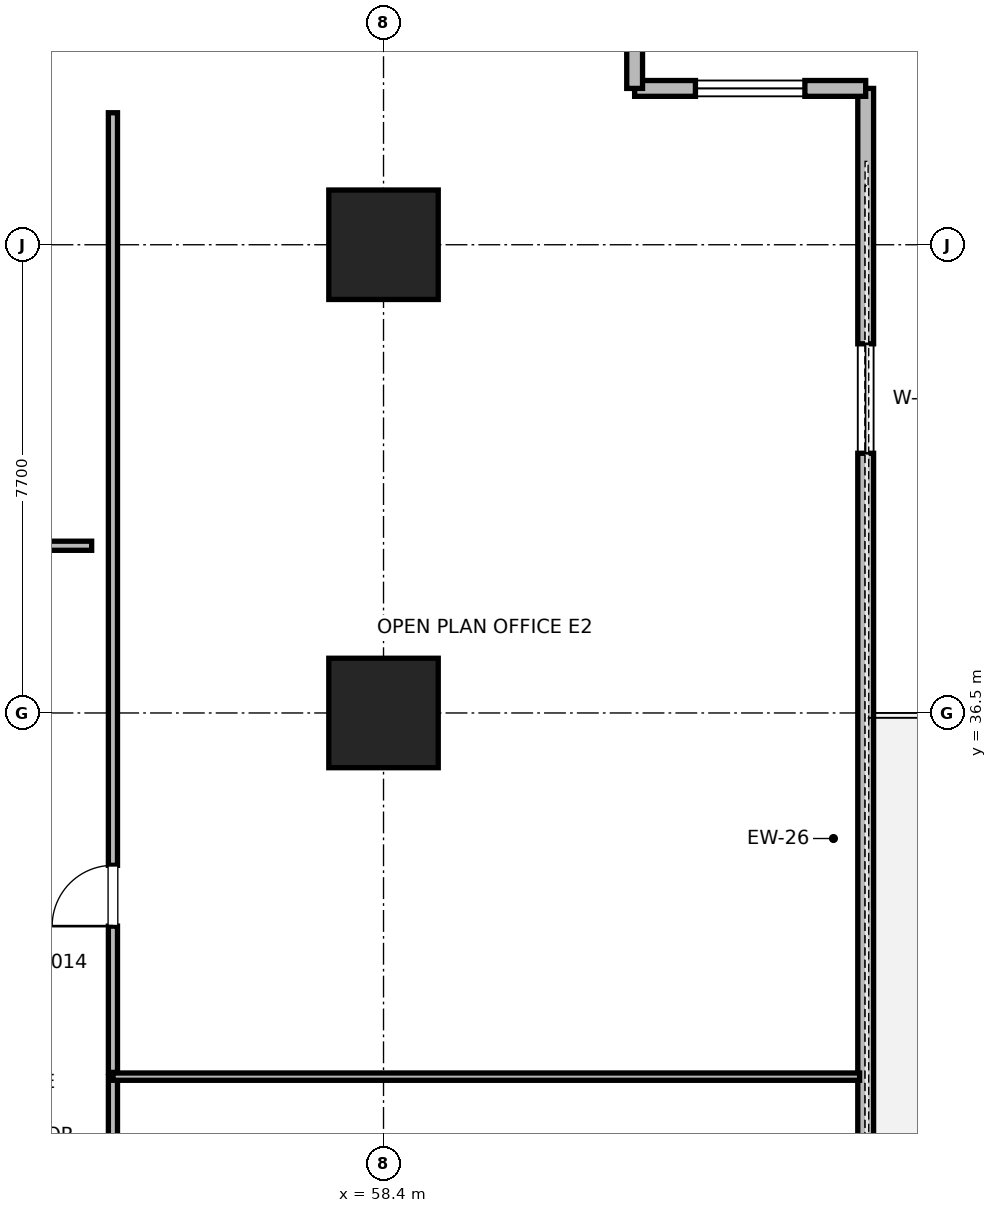
"""IFC4 building model, lengths in metres.
Left out: names, types, materials, properties, quantities, classifications, styles, units other than length and angle.
Written with IfcOpenShell. Run it as: python <this file> out.ifc"""

import sys

from ifc_helpers import new_model, si_unit, direction, frame, frame_2d, origin, origin_2d, place, context, subcontext, project, spatial, rectangle, extrude, element, fill, save


model = new_model("IFC4")
c1 = context("Model", 3, precision=1e-05, world=origin(), true_north=direction((0.0, 1.0)))
c2 = subcontext(c1, "Body", "Model", "MODEL_VIEW")
j1 = project(units=[si_unit("LENGTHUNIT", "METRE"), si_unit("PLANEANGLEUNIT", "RADIAN")], contexts=[c1])
p1 = place(None, origin())
s1 = spatial("IfcSite", under=j1, at=p1, CompositionType="ELEMENT")
p2 = place(p1, origin())
s2 = spatial("IfcBuilding", under=s1, at=p2, CompositionType="ELEMENT")
p3 = place(p2, frame((0.0, 0.0, 87.6)))
s3 = spatial("IfcBuildingStorey", under=s2, at=p3, CompositionType="ELEMENT", Elevation=87.6)
for number, where, z_axis, x_axis in (
    (1, (58.4, 36.5, 0.0), (0.0, 0.0, 1.0), (1.0, 0.0, 0.0)),
    (2, (58.4, 44.2, 0.0), (0.0, 0.0, 1.0), (1.0, 0.0, 0.0)),
):
    element("IfcColumn", number, at=place(p3, frame(where, z_axis=z_axis, x_axis=x_axis)), inside=s3, PredefinedType="COLUMN", context=c2, shape_type="SweptSolid", body=[
        extrude(rectangle(XDim=1.8, YDim=1.8, at=origin_2d()), origin(), (0.0, 0.0, 1.0), 4.0),
    ])
p4 = place(p3, frame((66.33, 8.229, 0.0), z_axis=(0.0, 0.0, 1.0), x_axis=(0.0, 1.0, 0.0)))
e3 = element("IfcWall", 3, at=p4, inside=s3, PredefinedType="PARAPET", context=c2, shape_type="SweptSolid", body=[
    extrude(rectangle(XDim=38.542, YDim=0.26, at=frame_2d((19.271, 0.0))), origin(), (0.0, 0.0, 1.0), 2.889),
])
p5 = place(p4, frame((4.2, 0.0, 0.85)))
e4 = element("IfcOpeningElement", 4, at=p5, cuts=e3, PredefinedType="OPENING", context=c2, shape_type="SweptSolid", body=[
    extrude(rectangle(XDim=1.8, YDim=2.2, at=frame_2d((0.9, 1.1))), frame((0.0, 0.13, 0.0), z_axis=(0.0, -1.0, 0.0), x_axis=(1.0, 0.0, 0.0)), (0.0, 0.0, 1.0), 0.26),
])
p6 = place(p4, frame((18.671, 0.0, 0.0)))
e5 = element("IfcOpeningElement", 5, at=p6, cuts=e3, PredefinedType="OPENING", context=c2, shape_type="SweptSolid", body=[
    extrude(rectangle(XDim=1.2, YDim=2.2, at=frame_2d((0.6, 1.1))), frame((0.0, 0.13, 0.0), z_axis=(0.0, -1.0, 0.0), x_axis=(1.0, 0.0, 0.0)), (0.0, 0.0, 1.0), 0.26),
])
p7 = place(p4, frame((32.542, 0.0, 0.85)))
e6 = element("IfcOpeningElement", 6, at=p7, cuts=e3, PredefinedType="OPENING", context=c2, shape_type="SweptSolid", body=[
    extrude(rectangle(XDim=1.8, YDim=2.2, at=frame_2d((0.9, 1.1))), frame((0.0, 0.13, 0.0), z_axis=(0.0, -1.0, 0.0), x_axis=(1.0, 0.0, 0.0)), (0.0, 0.0, 1.0), 0.26),
])
p8 = place(p3, frame((66.33, 46.771, 0.0), z_axis=(0.0, 0.0, 1.0), x_axis=(-1.0, 0.0, 0.0)))
e7 = element("IfcWall", 7, at=p8, inside=s3, PredefinedType="PARAPET", context=c2, shape_type="SweptSolid", body=[
    extrude(rectangle(XDim=3.8, YDim=0.26, at=frame_2d((1.9, 0.0))), origin(), (0.0, 0.0, 1.0), 3.76),
])
p9 = place(p8, frame((1.0, 0.0, 0.85)))
e8 = element("IfcOpeningElement", 8, at=p9, cuts=e7, PredefinedType="OPENING", context=c2, shape_type="SweptSolid", body=[
    extrude(rectangle(XDim=1.8, YDim=2.2, at=frame_2d((0.9, 1.1))), frame((0.0, 0.13, 0.0), z_axis=(0.0, -1.0, 0.0), x_axis=(1.0, 0.0, 0.0)), (0.0, 0.0, 1.0), 0.26),
])
p10 = place(p3, frame((62.53, 46.771, 0.0), z_axis=(0.0, 0.0, 1.0), x_axis=(0.0, 1.0, 0.0)))
e9 = element("IfcWall", 9, at=p10, inside=s3, PredefinedType="PARAPET", context=c2, shape_type="SweptSolid", body=[
    extrude(rectangle(XDim=3.4, YDim=0.26, at=frame_2d((1.7, 0.0))), origin(), (0.0, 0.0, 1.0), 3.76),
])
p11 = place(p3, frame((48.774, 39.25, 0.0), z_axis=(0.0, 0.0, 1.0), x_axis=(1.0, 0.0, 0.0)))
e10 = element("IfcWall", 10, at=p11, inside=s3, PredefinedType="PARTITIONING", context=c2, shape_type="SweptSolid", body=[
    extrude(rectangle(XDim=4.826, YDim=0.15, at=frame_2d((2.413, 0.0))), origin(), (0.0, 0.0, 1.0), 2.85),
])
p12 = place(p11, frame((1.838, 0.0, 0.0)))
e11 = element("IfcOpeningElement", 11, at=p12, cuts=e10, PredefinedType="OPENING", context=c2, shape_type="SweptSolid", body=[
    extrude(rectangle(XDim=1.05, YDim=2.2, at=frame_2d((0.525, 1.1))), frame((0.0, 0.075, 0.0), z_axis=(0.0, -1.0, 0.0), x_axis=(1.0, 0.0, 0.0)), (0.0, 0.0, 1.0), 0.15),
])
p13 = place(p3, frame((53.95, 8.629, 0.0), z_axis=(0.0, 0.0, 1.0), x_axis=(0.0, 1.0, 0.0)))
e12 = element("IfcWall", 12, at=p13, inside=s3, PredefinedType="PARTITIONING", context=c2, shape_type="SweptSolid", body=[
    extrude(rectangle(XDim=21.89, YDim=0.15, at=frame_2d((10.945, 0.0))), origin(), (0.0, 0.0, 1.0), 2.85),
])
p14 = place(p13, frame((15.396, 0.0, 0.0)))
e13 = element("IfcOpeningElement", 13, at=p14, cuts=e12, PredefinedType="OPENING", context=c2, shape_type="SweptSolid", body=[
    extrude(rectangle(XDim=1.0, YDim=2.15, at=frame_2d((0.5, 1.075))), frame((0.0, 0.075, 0.0), z_axis=(0.0, -1.0, 0.0), x_axis=(1.0, 0.0, 0.0)), (0.0, 0.0, 1.0), 0.15),
])
p15 = place(p3, frame((53.95, 30.519, 0.0), z_axis=(0.0, 0.0, 1.0), x_axis=(1.0, 0.0, 0.0)))
e14 = element("IfcWall", 14, at=p15, inside=s3, PredefinedType="PARTITIONING", context=c2, shape_type="SweptSolid", body=[
    extrude(rectangle(XDim=12.28, YDim=0.12, at=frame_2d((6.14, 0.0))), origin(), (0.0, 0.0, 1.0), 2.85),
])
p16 = place(p3, frame((53.95, 30.589, 0.0), z_axis=(0.0, 0.0, 1.0), x_axis=(0.0, 1.0, 0.0)))
e15 = element("IfcWall", 15, at=p16, inside=s3, PredefinedType="PARTITIONING", context=c2, shape_type="SweptSolid", body=[
    extrude(rectangle(XDim=15.781, YDim=0.15, at=frame_2d((7.891, 0.0))), origin(), (0.0, 0.0, 1.0), 2.85),
])
p17 = place(p16, frame((2.405, 0.0, 0.0)))
e16 = element("IfcOpeningElement", 16, at=p17, cuts=e15, PredefinedType="OPENING", context=c2, shape_type="SweptSolid", body=[
    extrude(rectangle(XDim=1.0, YDim=2.15, at=frame_2d((0.5, 1.075))), frame((0.0, 0.075, 0.0), z_axis=(0.0, -1.0, 0.0), x_axis=(1.0, 0.0, 0.0)), (0.0, 0.0, 1.0), 0.15),
])
p18 = place(p7, origin())
e17 = element("IfcWindow", 17, at=p18, inside=s3, PartitioningType="SINGLE_PANEL", PredefinedType="WINDOW", context=c2, shape_type="SweptSolid", body=[
    extrude(rectangle(XDim=1.8, YDim=2.2, at=frame_2d((0.9, 1.1))), frame((0.0, 0.03, 0.0), z_axis=(0.0, -1.0, 0.0), x_axis=(1.0, 0.0, 0.0)), (0.0, 0.0, 1.0), 0.06),
])
fill(e6, e17)
p19 = place(p9, origin())
e18 = element("IfcWindow", 18, at=p19, inside=s3, PartitioningType="SINGLE_PANEL", PredefinedType="WINDOW", context=c2, shape_type="SweptSolid", body=[
    extrude(rectangle(XDim=1.8, YDim=2.2, at=frame_2d((0.9, 1.1))), frame((0.0, 0.03, 0.0), z_axis=(0.0, -1.0, 0.0), x_axis=(1.0, 0.0, 0.0)), (0.0, 0.0, 1.0), 0.06),
])
fill(e8, e18)
p20 = place(p17, origin())
e19 = element("IfcDoor", 19, at=p20, inside=s3, OperationType="SINGLE_SWING_LEFT", PredefinedType="DOOR", context=c2, shape_type="SweptSolid", body=[
    extrude(rectangle(XDim=1.0, YDim=2.15, at=frame_2d((0.5, 1.075))), frame((0.0, 0.025, 0.0), z_axis=(0.0, -1.0, 0.0), x_axis=(1.0, 0.0, 0.0)), (0.0, 0.0, 1.0), 0.05),
])
fill(e16, e19)
save(model, sys.argv[1])
